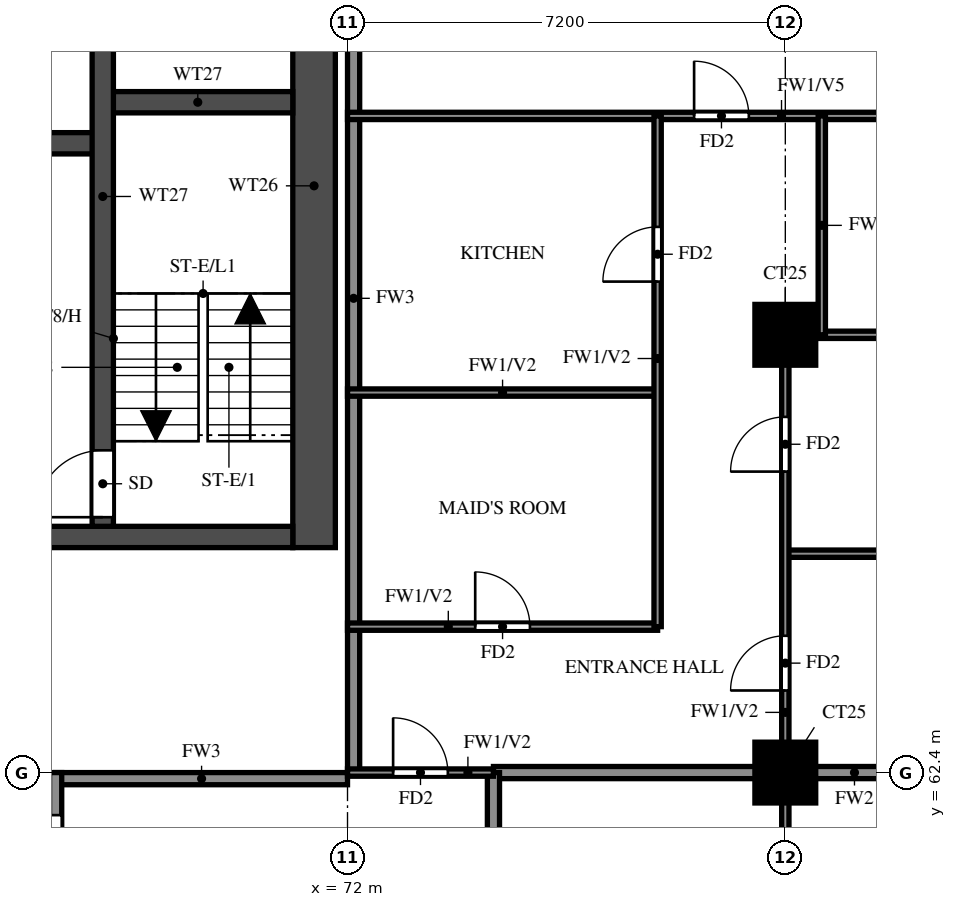
"""IFC4 building model, lengths in metres.
Left out: names, types, materials, properties, quantities, classifications, styles, units other than length and angle.
Written with IfcOpenShell. Run it as: python <this file> out.ifc"""

import sys

from ifc_helpers import new_model, si_unit, direction, frame, frame_2d, origin, origin_2d, place, context, subcontext, project, spatial, rectangle, extrude, source, transform, mapped, element, fill, save


model = new_model("IFC4")
c1 = context("Model", 3, precision=1e-05, world=origin(), true_north=direction((0.0, 1.0)))
c2 = subcontext(c1, "Body", "Model", "MODEL_VIEW")
j1 = project(units=[si_unit("LENGTHUNIT", "METRE"), si_unit("PLANEANGLEUNIT", "RADIAN")], contexts=[c1])
p1 = place(None, origin())
s1 = spatial("IfcSite", under=j1, at=p1, CompositionType="ELEMENT")
p2 = place(p1, origin())
s2 = spatial("IfcBuilding", under=s1, at=p2, CompositionType="ELEMENT")
p3 = place(p2, frame((0.0, 0.0, 171.0)))
s3 = spatial("IfcBuildingStorey", under=s2, at=p3, CompositionType="ELEMENT", Elevation=171.0)
m1 = source(origin(), c2, "Body", "SweptSolid", [
    extrude(rectangle(XDim=1.0, YDim=1.0, at=origin_2d()), origin(), (0.0, 0.0, 1.0), 3.2),
])
for number, where, z_axis, x_axis in (
    (1, (79.2, 62.4, 0.0), (0.0, 0.0, 1.0), (1.0, 0.0, 0.0)),
    (2, (79.2, 69.6, 0.0), (0.0, 0.0, 1.0), (1.0, 0.0, 0.0)),
):
    element("IfcColumn", number, at=place(p3, frame(where, z_axis=z_axis, x_axis=x_axis)), inside=s3, PredefinedType="COLUMN", context=c2, shape_type="MappedRepresentation", body=[
        mapped(m1, transform((0.0, 0.0, 0.0))),
    ])
p4 = place(p3, frame((71.45, 66.1, 0.0), z_axis=(0.0, 0.0, 1.0), x_axis=(0.0, 1.0, 0.0)))
e3 = element("IfcWall", 3, at=p4, inside=s3, PredefinedType="SHEAR", context=c2, shape_type="SweptSolid", body=[
    extrude(rectangle(XDim=11.9, YDim=0.7, at=frame_2d((5.95, 0.0))), origin(), (0.0, 0.0, 1.0), 3.2),
])
p5 = place(p3, frame((29.7, 66.275, 0.0), z_axis=(0.0, 0.0, 1.0), x_axis=(1.0, 0.0, 0.0)))
e4 = element("IfcWall", 4, at=p5, inside=s3, PredefinedType="SHEAR", context=c2, shape_type="SweptSolid", body=[
    extrude(rectangle(XDim=41.4, YDim=0.35, at=frame_2d((20.7, 0.0))), origin(), (0.0, 0.0, 1.0), 3.2),
])
p6 = place(p5, frame((0.925, 0.0, 0.0)))
e5 = element("IfcOpeningElement", 5, at=p6, cuts=e4, PredefinedType="OPENING", context=c2, shape_type="SweptSolid", body=[
    extrude(rectangle(XDim=1.1, YDim=2.1, at=frame_2d((0.55, 1.05))), frame((0.0, 0.185, 0.0), z_axis=(0.0, -1.0, 0.0), x_axis=(1.0, 0.0, 0.0)), (0.0, 0.0, 1.0), 0.37),
])
p7 = place(p5, frame((3.712, 0.0, 0.0)))
e6 = element("IfcOpeningElement", 6, at=p7, cuts=e4, PredefinedType="OPENING", context=c2, shape_type="SweptSolid", body=[
    extrude(rectangle(XDim=1.8, YDim=2.1, at=frame_2d((0.9, 1.05))), frame((0.0, 0.185, 0.0), z_axis=(0.0, -1.0, 0.0), x_axis=(1.0, 0.0, 0.0)), (0.0, 0.0, 1.0), 0.37),
])
p8 = place(p3, frame((32.825, 72.75, 0.0), z_axis=(0.0, 0.0, 1.0), x_axis=(1.0, 0.0, 0.0)))
e7 = element("IfcWall", 7, at=p8, inside=s3, PredefinedType="SHEAR", context=c2, shape_type="SweptSolid", body=[
    extrude(rectangle(XDim=35.15, YDim=0.35, at=frame_2d((17.575, 0.0))), origin(), (0.0, 0.0, 1.0), 3.2),
])
p9 = place(p8, frame((19.8, 0.0, 0.0)))
e8 = element("IfcOpeningElement", 8, at=p9, cuts=e7, PredefinedType="OPENING", context=c2, shape_type="SweptSolid", body=[
    extrude(rectangle(XDim=1.1, YDim=2.1, at=frame_2d((0.55, 1.05))), frame((0.0, 0.185, 0.0), z_axis=(0.0, -1.0, 0.0), x_axis=(1.0, 0.0, 0.0)), (0.0, 0.0, 1.0), 0.37),
])
p10 = place(p8, frame((27.7, 0.0, 0.0)))
e9 = element("IfcOpeningElement", 9, at=p10, cuts=e7, PredefinedType="OPENING", context=c2, shape_type="SweptSolid", body=[
    extrude(rectangle(XDim=1.1, YDim=2.1, at=frame_2d((0.55, 1.05))), frame((0.0, 0.185, 0.0), z_axis=(0.0, -1.0, 0.0), x_axis=(1.0, 0.0, 0.0)), (0.0, 0.0, 1.0), 0.37),
])
p11 = place(p8, frame((30.3, 0.0, 0.0)))
e10 = element("IfcOpeningElement", 10, at=p11, cuts=e7, PredefinedType="OPENING", context=c2, shape_type="SweptSolid", body=[
    extrude(rectangle(XDim=1.1, YDim=2.1, at=frame_2d((0.55, 1.05))), frame((0.0, 0.185, 0.0), z_axis=(0.0, -1.0, 0.0), x_axis=(1.0, 0.0, 0.0)), (0.0, 0.0, 1.0), 0.37),
])
p12 = place(p8, frame((3.8, 0.0, 0.0)))
e11 = element("IfcOpeningElement", 11, at=p12, cuts=e7, PredefinedType="OPENING", context=c2, shape_type="SweptSolid", body=[
    extrude(rectangle(XDim=1.1, YDim=2.1, at=frame_2d((0.55, 1.05))), frame((0.0, 0.185, 0.0), z_axis=(0.0, -1.0, 0.0), x_axis=(1.0, 0.0, 0.0)), (0.0, 0.0, 1.0), 0.37),
])
p13 = place(p8, frame((6.55, 0.0, 0.0)))
e12 = element("IfcOpeningElement", 12, at=p13, cuts=e7, PredefinedType="OPENING", context=c2, shape_type="SweptSolid", body=[
    extrude(rectangle(XDim=1.1, YDim=2.1, at=frame_2d((0.55, 1.05))), frame((0.0, 0.185, 0.0), z_axis=(0.0, -1.0, 0.0), x_axis=(1.0, 0.0, 0.0)), (0.0, 0.0, 1.0), 0.37),
])
p14 = place(p8, frame((9.3, 0.0, 0.0)))
e13 = element("IfcOpeningElement", 13, at=p14, cuts=e7, PredefinedType="OPENING", context=c2, shape_type="SweptSolid", body=[
    extrude(rectangle(XDim=1.1, YDim=2.1, at=frame_2d((0.55, 1.05))), frame((0.0, 0.185, 0.0), z_axis=(0.0, -1.0, 0.0), x_axis=(1.0, 0.0, 0.0)), (0.0, 0.0, 1.0), 0.37),
])
p15 = place(p8, frame((12.05, 0.0, 0.0)))
e14 = element("IfcOpeningElement", 14, at=p15, cuts=e7, PredefinedType="OPENING", context=c2, shape_type="SweptSolid", body=[
    extrude(rectangle(XDim=1.1, YDim=2.1, at=frame_2d((0.55, 1.05))), frame((0.0, 0.185, 0.0), z_axis=(0.0, -1.0, 0.0), x_axis=(1.0, 0.0, 0.0)), (0.0, 0.0, 1.0), 0.37),
])
p16 = place(p8, frame((14.8, 0.0, 0.0)))
e15 = element("IfcOpeningElement", 15, at=p16, cuts=e7, PredefinedType="OPENING", context=c2, shape_type="SweptSolid", body=[
    extrude(rectangle(XDim=1.1, YDim=2.1, at=frame_2d((0.55, 1.05))), frame((0.0, 0.185, 0.0), z_axis=(0.0, -1.0, 0.0), x_axis=(1.0, 0.0, 0.0)), (0.0, 0.0, 1.0), 0.37),
])
p17 = place(p8, frame((17.55, 0.0, 0.0)))
e16 = element("IfcOpeningElement", 16, at=p17, cuts=e7, PredefinedType="OPENING", context=c2, shape_type="SweptSolid", body=[
    extrude(rectangle(XDim=1.1, YDim=2.1, at=frame_2d((0.55, 1.05))), frame((0.0, 0.185, 0.0), z_axis=(0.0, -1.0, 0.0), x_axis=(1.0, 0.0, 0.0)), (0.0, 0.0, 1.0), 0.37),
])
p18 = place(p8, frame((0.938, 0.0, 0.0)))
e17 = element("IfcOpeningElement", 17, at=p18, cuts=e7, PredefinedType="OPENING", context=c2, shape_type="SweptSolid", body=[
    extrude(rectangle(XDim=1.1, YDim=2.1, at=frame_2d((0.55, 1.05))), frame((0.0, 0.185, 0.0), z_axis=(0.0, -1.0, 0.0), x_axis=(1.0, 0.0, 0.0)), (0.0, 0.0, 1.0), 0.37),
])
p19 = place(p3, frame((67.975, 73.425, 0.0), z_axis=(0.0, 0.0, 1.0), x_axis=(1.0, 0.0, 0.0)))
e18 = element("IfcWall", 18, at=p19, inside=s3, PredefinedType="SHEAR", context=c2, shape_type="SweptSolid", body=[
    extrude(rectangle(XDim=3.125, YDim=0.35, at=frame_2d((1.562, 0.0))), origin(), (0.0, 0.0, 1.0), 3.2),
])
p20 = place(p3, frame((67.975, 66.45, 0.0), z_axis=(0.0, 0.0, 1.0), x_axis=(0.0, 1.0, 0.0)))
e19 = element("IfcWall", 19, at=p20, inside=s3, PredefinedType="SHEAR", context=c2, shape_type="SweptSolid", body=[
    extrude(rectangle(XDim=10.85, YDim=0.35, at=frame_2d((5.425, 0.0))), origin(), (0.0, 0.0, 1.0), 3.2),
])
p21 = place(p20, frame((0.15, 0.0, 0.0)))
e20 = element("IfcOpeningElement", 20, at=p21, cuts=e19, PredefinedType="OPENING", context=c2, shape_type="SweptSolid", body=[
    extrude(rectangle(XDim=1.1, YDim=2.1, at=frame_2d((0.55, 1.05))), frame((0.0, 0.185, 0.0), z_axis=(0.0, -1.0, 0.0), x_axis=(1.0, 0.0, 0.0)), (0.0, 0.0, 1.0), 0.37),
])
p22 = place(p3, frame((67.2, 62.3, 0.0), z_axis=(0.0, 0.0, 1.0), x_axis=(1.0, 0.0, 0.0)))
e21 = element("IfcWall", 21, at=p22, inside=s3, PredefinedType="SOLIDWALL", context=c2, shape_type="SweptSolid", body=[
    extrude(rectangle(XDim=4.8, YDim=0.2, at=frame_2d((2.4, 0.0))), origin(), (0.0, 0.0, 1.0), 3.2),
])
p23 = place(p3, frame((67.2, 45.6, 0.0), z_axis=(0.0, 0.0, 1.0), x_axis=(0.0, 1.0, 0.0)))
e22 = element("IfcWall", 22, at=p23, inside=s3, PredefinedType="SOLIDWALL", context=c2, shape_type="SweptSolid", body=[
    extrude(rectangle(XDim=16.8, YDim=0.2, at=frame_2d((8.4, 0.0))), origin(), (0.0, 0.0, 1.0), 3.2),
])
p24 = place(p23, frame((6.7, 0.0, 0.0)))
e23 = element("IfcOpeningElement", 23, at=p24, cuts=e22, PredefinedType="OPENING", context=c2, shape_type="SweptSolid", body=[
    extrude(rectangle(XDim=1.0, YDim=2.1, at=frame_2d((0.5, 1.05))), frame((0.0, 0.11, 0.0), z_axis=(0.0, -1.0, 0.0), x_axis=(1.0, 0.0, 0.0)), (0.0, 0.0, 1.0), 0.22),
])
p25 = place(p23, frame((15.1, 0.0, 0.0)))
e24 = element("IfcOpeningElement", 24, at=p25, cuts=e22, PredefinedType="OPENING", context=c2, shape_type="SweptSolid", body=[
    extrude(rectangle(XDim=1.0, YDim=2.1, at=frame_2d((0.5, 1.05))), frame((0.0, 0.11, 0.0), z_axis=(0.0, -1.0, 0.0), x_axis=(1.0, 0.0, 0.0)), (0.0, 0.0, 1.0), 0.22),
])
p26 = place(p23, frame((0.7, 0.0, 0.0)))
e25 = element("IfcOpeningElement", 25, at=p26, cuts=e22, PredefinedType="OPENING", context=c2, shape_type="SweptSolid", body=[
    extrude(rectangle(XDim=1.0, YDim=2.1, at=frame_2d((0.5, 1.05))), frame((0.0, 0.11, 0.0), z_axis=(0.0, -1.0, 0.0), x_axis=(1.0, 0.0, 0.0)), (0.0, 0.0, 1.0), 0.22),
])
p27 = place(p3, frame((72.1, 62.4, 0.0), z_axis=(0.0, 0.0, 1.0), x_axis=(0.0, 1.0, 0.0)))
e26 = element("IfcWall", 26, at=p27, inside=s3, PredefinedType="SOLIDWALL", context=c2, shape_type="SweptSolid", body=[
    extrude(rectangle(XDim=15.6, YDim=0.2, at=frame_2d((7.8, 0.0))), origin(), (0.0, 0.0, 1.0), 3.2),
])
p28 = place(p3, frame((74.4, 62.4, 0.0), z_axis=(0.0, 0.0, 1.0), x_axis=(1.0, 0.0, 0.0)))
e27 = element("IfcWall", 27, at=p28, inside=s3, PredefinedType="SOLIDWALL", context=c2, shape_type="SweptSolid", body=[
    extrude(rectangle(XDim=11.875, YDim=0.2, at=frame_2d((5.938, 0.0))), origin(), (0.0, 0.0, 1.0), 3.2),
])
p29 = place(p3, frame((74.4, 60.0, 0.0), z_axis=(0.0, 0.0, 1.0), x_axis=(0.0, 1.0, 0.0)))
e28 = element("IfcWall", 28, at=p29, inside=s3, PredefinedType="SOLIDWALL", context=c2, shape_type="SweptSolid", body=[
    extrude(rectangle(XDim=2.4, YDim=0.2, at=frame_2d((1.2, 0.0))), origin(), (0.0, 0.0, 1.0), 3.2),
])
p30 = place(p3, frame((72.0, 62.4, 0.0), z_axis=(0.0, 0.0, 1.0), x_axis=(1.0, 0.0, 0.0)))
e29 = element("IfcWall", 29, at=p30, inside=s3, PredefinedType="PARTITIONING", context=c2, shape_type="SweptSolid", body=[
    extrude(rectangle(XDim=2.4, YDim=0.12, at=frame_2d((1.2, 0.0))), origin(), (0.0, 0.0, 1.0), 3.2),
])
p31 = place(p30, frame((0.75, 0.0, 0.0)))
e30 = element("IfcOpeningElement", 30, at=p31, cuts=e29, PredefinedType="OPENING", context=c2, shape_type="SweptSolid", body=[
    extrude(rectangle(XDim=0.9, YDim=2.1, at=frame_2d((0.45, 1.05))), frame((0.0, 0.07, 0.0), z_axis=(0.0, -1.0, 0.0), x_axis=(1.0, 0.0, 0.0)), (0.0, 0.0, 1.0), 0.14),
])
p32 = place(p3, frame((72.0, 64.8, 0.0), z_axis=(0.0, 0.0, 1.0), x_axis=(1.0, 0.0, 0.0)))
e31 = element("IfcWall", 31, at=p32, inside=s3, PredefinedType="PARTITIONING", context=c2, shape_type="SweptSolid", body=[
    extrude(rectangle(XDim=5.1, YDim=0.12, at=frame_2d((2.55, 0.0))), origin(), (0.0, 0.0, 1.0), 3.2),
])
p33 = place(p32, frame((2.1, 0.0, 0.0)))
e32 = element("IfcOpeningElement", 32, at=p33, cuts=e31, PredefinedType="OPENING", context=c2, shape_type="SweptSolid", body=[
    extrude(rectangle(XDim=0.9, YDim=2.1, at=frame_2d((0.45, 1.05))), frame((0.0, 0.07, 0.0), z_axis=(0.0, -1.0, 0.0), x_axis=(1.0, 0.0, 0.0)), (0.0, 0.0, 1.0), 0.14),
])
p34 = place(p3, frame((79.2, 66.0, 0.0), z_axis=(0.0, 0.0, 1.0), x_axis=(1.0, 0.0, 0.0)))
e33 = element("IfcWall", 33, at=p34, inside=s3, PredefinedType="PARTITIONING", context=c2, shape_type="SweptSolid", body=[
    extrude(rectangle(XDim=7.075, YDim=0.12, at=frame_2d((3.538, 0.0))), origin(), (0.0, 0.0, 1.0), 2.3),
])
p35 = place(p3, frame((72.0, 68.65, 0.0), z_axis=(0.0, 0.0, 1.0), x_axis=(1.0, 0.0, 0.0)))
e34 = element("IfcWall", 34, at=p35, inside=s3, PredefinedType="PARTITIONING", context=c2, shape_type="SweptSolid", body=[
    extrude(rectangle(XDim=5.1, YDim=0.12, at=frame_2d((2.55, 0.0))), origin(), (0.0, 0.0, 1.0), 3.2),
])
p36 = place(p3, frame((79.2, 69.6, 0.0), z_axis=(0.0, 0.0, 1.0), x_axis=(1.0, 0.0, 0.0)))
e35 = element("IfcWall", 35, at=p36, inside=s3, PredefinedType="PARTITIONING", context=c2, shape_type="SweptSolid", body=[
    extrude(rectangle(XDim=7.075, YDim=0.12, at=frame_2d((3.538, 0.0))), origin(), (0.0, 0.0, 1.0), 3.2),
])
p37 = place(p36, frame((3.438, 0.0, 0.0)))
e36 = element("IfcOpeningElement", 36, at=p37, cuts=e35, PredefinedType="OPENING", context=c2, shape_type="SweptSolid", body=[
    extrude(rectangle(XDim=0.8, YDim=2.1, at=frame_2d((0.4, 1.05))), frame((0.0, 0.07, 0.0), z_axis=(0.0, -1.0, 0.0), x_axis=(1.0, 0.0, 0.0)), (0.0, 0.0, 1.0), 0.14),
])
p38 = place(p3, frame((72.0, 73.2, 0.0), z_axis=(0.0, 0.0, 1.0), x_axis=(1.0, 0.0, 0.0)))
e37 = element("IfcWall", 37, at=p38, inside=s3, PredefinedType="PARTITIONING", context=c2, shape_type="SweptSolid", body=[
    extrude(rectangle(XDim=14.275, YDim=0.12, at=frame_2d((7.137, 0.0))), origin(), (0.0, 0.0, 1.0), 2.3),
])
p39 = place(p38, frame((5.7, 0.0, 0.0)))
e38 = element("IfcOpeningElement", 38, at=p39, cuts=e37, PredefinedType="OPENING", context=c2, shape_type="SweptSolid", body=[
    extrude(rectangle(XDim=0.9, YDim=2.1, at=frame_2d((0.45, 1.05))), frame((0.0, 0.07, 0.0), z_axis=(0.0, -1.0, 0.0), x_axis=(1.0, 0.0, 0.0)), (0.0, 0.0, 1.0), 0.14),
])
p40 = place(p3, frame((77.1, 64.8, 0.0), z_axis=(0.0, 0.0, 1.0), x_axis=(0.0, 1.0, 0.0)))
e39 = element("IfcWall", 39, at=p40, inside=s3, PredefinedType="PARTITIONING", context=c2, shape_type="SweptSolid", body=[
    extrude(rectangle(XDim=8.4, YDim=0.12, at=frame_2d((4.2, 0.0))), origin(), (0.0, 0.0, 1.0), 3.2),
])
p41 = place(p40, frame((5.675, 0.0, 0.0)))
e40 = element("IfcOpeningElement", 40, at=p41, cuts=e39, PredefinedType="OPENING", context=c2, shape_type="SweptSolid", body=[
    extrude(rectangle(XDim=0.9, YDim=2.1, at=frame_2d((0.45, 1.05))), frame((0.0, 0.07, 0.0), z_axis=(0.0, -1.0, 0.0), x_axis=(1.0, 0.0, 0.0)), (0.0, 0.0, 1.0), 0.14),
])
p42 = place(p3, frame((79.2, 58.8, 0.0), z_axis=(0.0, 0.0, 1.0), x_axis=(0.0, 1.0, 0.0)))
e41 = element("IfcWall", 41, at=p42, inside=s3, PredefinedType="PARTITIONING", context=c2, shape_type="SweptSolid", body=[
    extrude(rectangle(XDim=10.8, YDim=0.12, at=frame_2d((5.4, 0.0))), origin(), (0.0, 0.0, 1.0), 3.2),
])
p43 = place(p42, frame((1.35, 0.0, 0.0)))
e42 = element("IfcOpeningElement", 42, at=p43, cuts=e41, PredefinedType="OPENING", context=c2, shape_type="SweptSolid", body=[
    extrude(rectangle(XDim=0.9, YDim=2.1, at=frame_2d((0.45, 1.05))), frame((0.0, 0.07, 0.0), z_axis=(0.0, -1.0, 0.0), x_axis=(1.0, 0.0, 0.0)), (0.0, 0.0, 1.0), 0.14),
])
p44 = place(p42, frame((4.95, 0.0, 0.0)))
e43 = element("IfcOpeningElement", 43, at=p44, cuts=e41, PredefinedType="OPENING", context=c2, shape_type="SweptSolid", body=[
    extrude(rectangle(XDim=0.9, YDim=2.1, at=frame_2d((0.45, 1.05))), frame((0.0, 0.07, 0.0), z_axis=(0.0, -1.0, 0.0), x_axis=(1.0, 0.0, 0.0)), (0.0, 0.0, 1.0), 0.14),
])
p45 = place(p42, frame((8.55, 0.0, 0.0)))
e44 = element("IfcOpeningElement", 44, at=p45, cuts=e41, PredefinedType="OPENING", context=c2, shape_type="SweptSolid", body=[
    extrude(rectangle(XDim=0.9, YDim=2.1, at=frame_2d((0.45, 1.05))), frame((0.0, 0.07, 0.0), z_axis=(0.0, -1.0, 0.0), x_axis=(1.0, 0.0, 0.0)), (0.0, 0.0, 1.0), 0.14),
])
p46 = place(p3, frame((79.8, 69.6, 0.0), z_axis=(0.0, 0.0, 1.0), x_axis=(0.0, 1.0, 0.0)))
e45 = element("IfcWall", 45, at=p46, inside=s3, PredefinedType="PARTITIONING", context=c2, shape_type="SweptSolid", body=[
    extrude(rectangle(XDim=3.6, YDim=0.12, at=frame_2d((1.8, 0.0))), origin(), (0.0, 0.0, 1.0), 3.2),
])
p47 = place(p21, origin())
e46 = element("IfcDoor", 46, at=p47, inside=s3, OperationType="SINGLE_SWING_LEFT", PredefinedType="DOOR", context=c2, shape_type="SweptSolid", body=[
    extrude(rectangle(XDim=1.1, YDim=2.1, at=frame_2d((0.55, 1.05))), frame((0.0, 0.025, 0.0), z_axis=(0.0, -1.0, 0.0), x_axis=(1.0, 0.0, 0.0)), (0.0, 0.0, 1.0), 0.05),
])
fill(e20, e46)
p48 = place(p31, origin())
e47 = element("IfcDoor", 47, at=p48, inside=s3, OperationType="SINGLE_SWING_LEFT", PredefinedType="DOOR", context=c2, shape_type="SweptSolid", body=[
    extrude(rectangle(XDim=0.9, YDim=2.1, at=frame_2d((0.45, 1.05))), frame((0.0, 0.025, 0.0), z_axis=(0.0, -1.0, 0.0), x_axis=(1.0, 0.0, 0.0)), (0.0, 0.0, 1.0), 0.05),
])
fill(e30, e47)
p49 = place(p25, origin())
e48 = element("IfcDoor", 48, at=p49, inside=s3, OperationType="SINGLE_SWING_RIGHT", PredefinedType="DOOR", context=c2, shape_type="SweptSolid", body=[
    extrude(rectangle(XDim=1.0, YDim=2.1, at=frame_2d((0.5, 1.05))), frame((0.0, 0.025, 0.0), z_axis=(0.0, -1.0, 0.0), x_axis=(1.0, 0.0, 0.0)), (0.0, 0.0, 1.0), 0.05),
])
fill(e24, e48)
p50 = place(p44, origin())
e49 = element("IfcDoor", 49, at=p50, inside=s3, OperationType="SINGLE_SWING_LEFT", PredefinedType="DOOR", context=c2, shape_type="SweptSolid", body=[
    extrude(rectangle(XDim=0.9, YDim=2.1, at=frame_2d((0.45, 1.05))), frame((0.0, 0.025, 0.0), z_axis=(0.0, -1.0, 0.0), x_axis=(1.0, 0.0, 0.0)), (0.0, 0.0, 1.0), 0.05),
])
fill(e43, e49)
p51 = place(p45, origin())
e50 = element("IfcDoor", 50, at=p51, inside=s3, OperationType="SINGLE_SWING_LEFT", PredefinedType="DOOR", context=c2, shape_type="SweptSolid", body=[
    extrude(rectangle(XDim=0.9, YDim=2.1, at=frame_2d((0.45, 1.05))), frame((0.0, 0.025, 0.0), z_axis=(0.0, -1.0, 0.0), x_axis=(1.0, 0.0, 0.0)), (0.0, 0.0, 1.0), 0.05),
])
fill(e44, e50)
p52 = place(p39, origin())
e51 = element("IfcDoor", 51, at=p52, inside=s3, OperationType="SINGLE_SWING_LEFT", PredefinedType="DOOR", context=c2, shape_type="SweptSolid", body=[
    extrude(rectangle(XDim=0.9, YDim=2.1, at=frame_2d((0.45, 1.05))), frame((0.0, 0.025, 0.0), z_axis=(0.0, -1.0, 0.0), x_axis=(1.0, 0.0, 0.0)), (0.0, 0.0, 1.0), 0.05),
])
fill(e38, e51)
p53 = place(p33, origin())
e52 = element("IfcDoor", 52, at=p53, inside=s3, OperationType="SINGLE_SWING_LEFT", PredefinedType="DOOR", context=c2, shape_type="SweptSolid", body=[
    extrude(rectangle(XDim=0.9, YDim=2.1, at=frame_2d((0.45, 1.05))), frame((0.0, 0.025, 0.0), z_axis=(0.0, -1.0, 0.0), x_axis=(1.0, 0.0, 0.0)), (0.0, 0.0, 1.0), 0.05),
])
fill(e32, e52)
p54 = place(p41, origin())
e53 = element("IfcDoor", 53, at=p54, inside=s3, OperationType="SINGLE_SWING_RIGHT", PredefinedType="DOOR", context=c2, shape_type="SweptSolid", body=[
    extrude(rectangle(XDim=0.9, YDim=2.1, at=frame_2d((0.45, 1.05))), frame((0.0, 0.025, 0.0), z_axis=(0.0, -1.0, 0.0), x_axis=(1.0, 0.0, 0.0)), (0.0, 0.0, 1.0), 0.05),
])
fill(e40, e53)
save(model, sys.argv[1])
